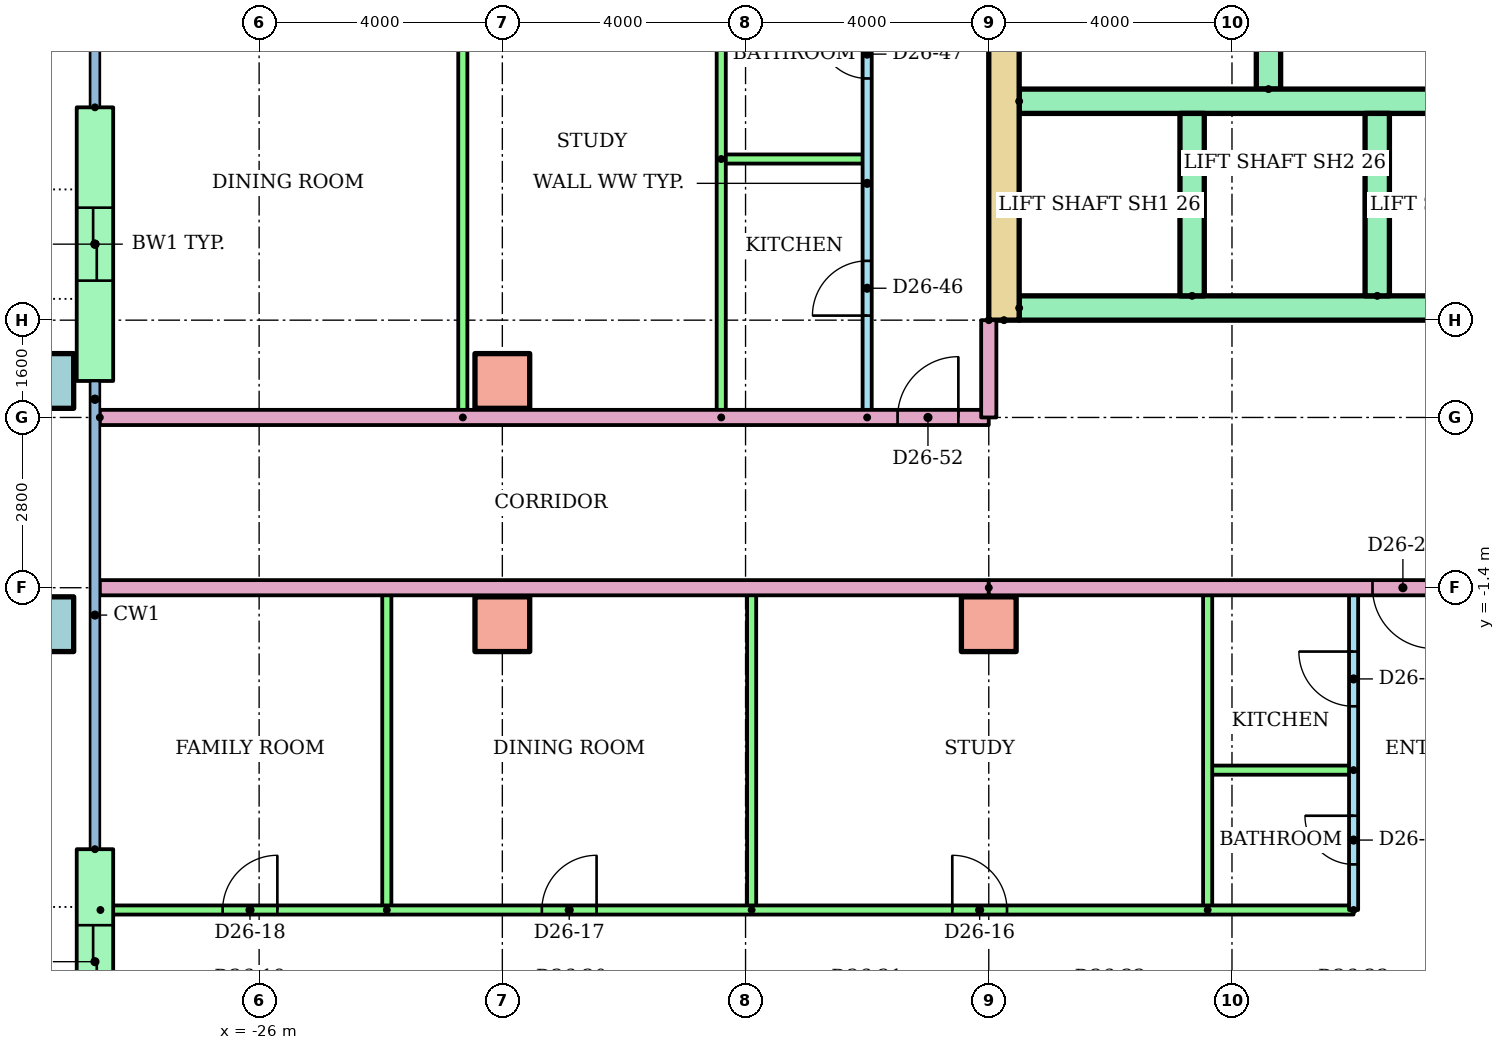
"""IFC4 building model, lengths in metres.
Left out: names, types, materials, properties, quantities, classifications, styles, units other than length and angle.
Written with IfcOpenShell. Run it as: python <this file> out.ifc"""

import sys

from ifc_helpers import new_model, si_unit, direction, frame, frame_2d, origin, origin_2d, place, context, subcontext, project, spatial, rectangle, hollow_rectangle, extrude, element, fill, save


model = new_model("IFC4")
c1 = context("Model", 3, precision=1e-05, world=origin(), true_north=direction((0.0, 1.0)))
c2 = subcontext(c1, "Body", "Model", "MODEL_VIEW")
j1 = project(units=[si_unit("LENGTHUNIT", "METRE"), si_unit("PLANEANGLEUNIT", "RADIAN")], contexts=[c1])
p1 = place(None, origin())
s1 = spatial("IfcSite", under=j1, at=p1, CompositionType="ELEMENT")
p2 = place(p1, origin())
s2 = spatial("IfcBuilding", under=s1, at=p2, CompositionType="ELEMENT")
p3 = place(p2, frame((0.0, 0.0, 99.9)))
s3 = spatial("IfcBuildingStorey", under=s2, at=p3, CompositionType="ELEMENT", Elevation=99.9)
p4 = place(p3, frame((-29.5, -2.0, 0.0)))
e1 = element("IfcColumn", 1, at=p4, inside=s3, PredefinedType="COLUMN", context=c2, shape_type="SweptSolid", body=[
    extrude(hollow_rectangle(XDim=0.9, YDim=0.9, WallThickness=0.045, at=origin_2d()), origin(), (0.0, 0.0, 1.0), 3.2),
])
for number, where in (
    (2, (-22.0, -2.0, 0.0)),
    (3, (-14.0, -2.0, 0.0)),
):
    element("IfcColumn", number, at=place(p3, frame(where)), inside=s3, PredefinedType="COLUMN", context=c2, shape_type="SweptSolid", body=[
        extrude(rectangle(XDim=0.9, YDim=0.9, at=origin_2d()), origin(), (0.0, 0.0, 1.0), 3.2),
    ])
p5 = place(p3, frame((-29.5, 2.0, 0.0)))
e4 = element("IfcColumn", 4, at=p5, inside=s3, PredefinedType="COLUMN", context=c2, shape_type="SweptSolid", body=[
    extrude(hollow_rectangle(XDim=0.9, YDim=0.9, WallThickness=0.045, at=origin_2d()), origin(), (0.0, 0.0, 1.0), 3.2),
])
p6 = place(p3, frame((-22.0, 2.0, 0.0)))
e5 = element("IfcColumn", 5, at=p6, inside=s3, PredefinedType="COLUMN", context=c2, shape_type="SweptSolid", body=[
    extrude(rectangle(XDim=0.9, YDim=0.9, at=origin_2d()), origin(), (0.0, 0.0, 1.0), 3.2),
])
p7 = place(p3, frame((-28.7, 6.5, 0.0), z_axis=(0.0, 0.0, 1.0), x_axis=(0.0, -1.0, 0.0)))
e6 = element("IfcWall", 6, at=p7, inside=s3, PredefinedType="STANDARD", context=c2, shape_type="SweptSolid", body=[
    extrude(rectangle(XDim=4.5, YDim=0.6, at=frame_2d((2.25, 0.0))), origin(), (0.0, 0.0, 1.0), 2.92),
])
p8 = place(p7, frame((1.65, 0.0, 0.0)))
e7 = element("IfcOpeningElement", 7, at=p8, cuts=e6, PredefinedType="OPENING", context=c2, shape_type="SweptSolid", body=[
    extrude(rectangle(XDim=1.2, YDim=2.1, at=frame_2d((0.6, 1.05))), frame((0.0, 0.31, 0.0), z_axis=(0.0, -1.0, 0.0), x_axis=(1.0, 0.0, 0.0)), (0.0, 0.0, 1.0), 0.62),
])
p9 = place(p3, frame((-28.7, -5.7, 0.0), z_axis=(0.0, 0.0, 1.0), x_axis=(0.0, -1.0, 0.0)))
e8 = element("IfcWall", 8, at=p9, inside=s3, PredefinedType="STANDARD", context=c2, shape_type="SweptSolid", body=[
    extrude(rectangle(XDim=3.7, YDim=0.6, at=frame_2d((1.85, 0.0))), origin(), (0.0, 0.0, 1.0), 2.92),
])
p10 = place(p9, frame((1.25, 0.0, 0.0)))
e9 = element("IfcOpeningElement", 9, at=p10, cuts=e8, PredefinedType="OPENING", context=c2, shape_type="SweptSolid", body=[
    extrude(rectangle(XDim=1.2, YDim=2.1, at=frame_2d((0.6, 1.05))), frame((0.0, 0.31, 0.0), z_axis=(0.0, -1.0, 0.0), x_axis=(1.0, 0.0, 0.0)), (0.0, 0.0, 1.0), 0.62),
])
p11 = place(p3, frame((-13.75, 3.0, 0.0), z_axis=(0.0, 0.0, 1.0), x_axis=(0.0, 1.0, 0.0)))
e10 = element("IfcWall", 10, at=p11, inside=s3, PredefinedType="SHEAR", context=c2, shape_type="SweptSolid", body=[
    extrude(rectangle(XDim=17.0, YDim=0.5, at=frame_2d((8.5, 0.0))), origin(), (0.0, 0.0, 1.0), 2.92),
])
p12 = place(p3, frame((-9.4, 6.8, 0.0), z_axis=(0.0, 0.0, 1.0), x_axis=(0.0, 1.0, 0.0)))
e11 = element("IfcWall", 11, at=p12, inside=s3, PredefinedType="SHEAR", context=c2, shape_type="SweptSolid", body=[
    extrude(rectangle(XDim=12.7, YDim=0.4, at=frame_2d((6.35, 0.0))), origin(), (0.0, 0.0, 1.0), 2.92),
])
p13 = place(p12, frame((1.15, 0.0, 0.0)))
e12 = element("IfcOpeningElement", 12, at=p13, cuts=e11, PredefinedType="OPENING", context=c2, shape_type="SweptSolid", body=[
    extrude(rectangle(XDim=1.0, YDim=2.1, at=frame_2d((0.5, 1.05))), frame((0.0, 0.21, 0.0), z_axis=(0.0, -1.0, 0.0), x_axis=(1.0, 0.0, 0.0)), (0.0, 0.0, 1.0), 0.42),
])
p14 = place(p12, frame((7.925, 0.0, 0.0)))
e13 = element("IfcOpeningElement", 13, at=p14, cuts=e11, PredefinedType="OPENING", context=c2, shape_type="SweptSolid", body=[
    extrude(rectangle(XDim=1.0, YDim=2.1, at=frame_2d((0.5, 1.05))), frame((0.0, 0.21, 0.0), z_axis=(0.0, -1.0, 0.0), x_axis=(1.0, 0.0, 0.0)), (0.0, 0.0, 1.0), 0.42),
])
p15 = place(p3, frame((-13.5, 3.2, 0.0)))
e14 = element("IfcWall", 14, at=p15, inside=s3, PredefinedType="SHEAR", context=c2, shape_type="SweptSolid", body=[
    extrude(rectangle(XDim=27.0, YDim=0.4, at=frame_2d((13.5, 0.0))), origin(), (0.0, 0.0, 1.0), 2.92),
])
p16 = place(p15, frame((6.861, 0.0, 0.0)))
e15 = element("IfcOpeningElement", 15, at=p16, cuts=e14, PredefinedType="OPENING", context=c2, shape_type="SweptSolid", body=[
    extrude(rectangle(XDim=1.1, YDim=2.1, at=frame_2d((0.55, 1.05))), frame((0.0, 0.21, 0.0), z_axis=(0.0, -1.0, 0.0), x_axis=(1.0, 0.0, 0.0)), (0.0, 0.0, 1.0), 0.42),
])
p17 = place(p15, frame((9.906, 0.0, 0.0)))
e16 = element("IfcOpeningElement", 16, at=p17, cuts=e14, PredefinedType="OPENING", context=c2, shape_type="SweptSolid", body=[
    extrude(rectangle(XDim=1.1, YDim=2.1, at=frame_2d((0.55, 1.05))), frame((0.0, 0.21, 0.0), z_axis=(0.0, -1.0, 0.0), x_axis=(1.0, 0.0, 0.0)), (0.0, 0.0, 1.0), 0.42),
])
p18 = place(p15, frame((15.994, 0.0, 0.0)))
e17 = element("IfcOpeningElement", 17, at=p18, cuts=e14, PredefinedType="OPENING", context=c2, shape_type="SweptSolid", body=[
    extrude(rectangle(XDim=1.1, YDim=2.1, at=frame_2d((0.55, 1.05))), frame((0.0, 0.21, 0.0), z_axis=(0.0, -1.0, 0.0), x_axis=(1.0, 0.0, 0.0)), (0.0, 0.0, 1.0), 0.42),
])
p19 = place(p15, frame((19.039, 0.0, 0.0)))
e18 = element("IfcOpeningElement", 18, at=p19, cuts=e14, PredefinedType="OPENING", context=c2, shape_type="SweptSolid", body=[
    extrude(rectangle(XDim=1.1, YDim=2.1, at=frame_2d((0.55, 1.05))), frame((0.0, 0.21, 0.0), z_axis=(0.0, -1.0, 0.0), x_axis=(1.0, 0.0, 0.0)), (0.0, 0.0, 1.0), 0.42),
])
p20 = place(p15, frame((12.6, 0.0, 0.0)))
e19 = element("IfcOpeningElement", 19, at=p20, cuts=e14, PredefinedType="OPENING", context=c2, shape_type="SweptSolid", body=[
    extrude(rectangle(XDim=1.8, YDim=2.1, at=frame_2d((0.9, 1.05))), frame((0.0, 0.21, 0.0), z_axis=(0.0, -1.0, 0.0), x_axis=(1.0, 0.0, 0.0)), (0.0, 0.0, 1.0), 0.42),
])
p21 = place(p3, frame((-13.5, 6.6, 0.0)))
e20 = element("IfcWall", 20, at=p21, inside=s3, PredefinedType="SHEAR", context=c2, shape_type="SweptSolid", body=[
    extrude(rectangle(XDim=11.978, YDim=0.4, at=frame_2d((5.989, 0.0))), origin(), (0.0, 0.0, 1.0), 2.92),
])
for number, where, z_axis, x_axis in (
    (21, (-10.656, 3.4, 0.0), (0.0, 0.0, 1.0), (0.0, 1.0, 0.0)),
    (22, (-7.611, 3.4, 0.0), (0.0, 0.0, 1.0), (0.0, 1.0, 0.0)),
):
    element("IfcWall", number, at=place(p3, frame(where, z_axis=z_axis, x_axis=x_axis)), inside=s3, PredefinedType="SHEAR", context=c2, shape_type="SweptSolid", body=[
        extrude(rectangle(XDim=3.0, YDim=0.4, at=frame_2d((1.5, 0.0))), origin(), (0.0, 0.0, 1.0), 2.92),
    ])
p22 = place(p3, frame((-8.0, -6.7, 0.0), z_axis=(0.0, 0.0, 1.0), x_axis=(0.0, 1.0, 0.0)))
e23 = element("IfcWall", 23, at=p22, inside=s3, PredefinedType="PARTITIONING", context=c2, shape_type="SweptSolid", body=[
    extrude(rectangle(XDim=5.3, YDim=0.15, at=frame_2d((2.65, 0.0))), origin(), (0.0, 0.0, 1.0), 2.4),
])
p23 = place(p22, frame((3.35, 0.0, 0.0)))
e24 = element("IfcOpeningElement", 24, at=p23, cuts=e23, PredefinedType="OPENING", context=c2, shape_type="SweptSolid", body=[
    extrude(rectangle(XDim=0.9, YDim=2.1, at=frame_2d((0.45, 1.05))), frame((0.0, 0.085, 0.0), z_axis=(0.0, -1.0, 0.0), x_axis=(1.0, 0.0, 0.0)), (0.0, 0.0, 1.0), 0.17),
])
p24 = place(p22, frame((0.75, 0.0, 0.0)))
e25 = element("IfcOpeningElement", 25, at=p24, cuts=e23, PredefinedType="OPENING", context=c2, shape_type="SweptSolid", body=[
    extrude(rectangle(XDim=0.8, YDim=2.1, at=frame_2d((0.4, 1.05))), frame((0.0, 0.085, 0.0), z_axis=(0.0, -1.0, 0.0), x_axis=(1.0, 0.0, 0.0)), (0.0, 0.0, 1.0), 0.17),
])
p25 = place(p3, frame((-8.0, -4.4, 0.0), z_axis=(0.0, 0.0, 1.0), x_axis=(-1.0, 0.0, 0.0)))
e26 = element("IfcWall", 26, at=p25, inside=s3, PredefinedType="PARTITIONING", context=c2, shape_type="SweptSolid", body=[
    extrude(rectangle(XDim=2.4, YDim=0.15, at=frame_2d((1.2, 0.0))), origin(), (0.0, 0.0, 1.0), 2.4),
])
for number, where, z_axis, x_axis in (
    (27, (-10.4, -6.7, 0.0), (0.0, 0.0, 1.0), (0.0, 1.0, 0.0)),
    (28, (-17.9, -6.7, 0.0), (0.0, 0.0, 1.0), (0.0, 1.0, 0.0)),
    (29, (-23.9, -6.7, 0.0), (0.0, 0.0, 1.0), (0.0, 1.0, 0.0)),
):
    element("IfcWall", number, at=place(p3, frame(where, z_axis=z_axis, x_axis=x_axis)), inside=s3, PredefinedType="PARTITIONING", context=c2, shape_type="SweptSolid", body=[
        extrude(rectangle(XDim=5.3, YDim=0.15, at=frame_2d((2.65, 0.0))), origin(), (0.0, 0.0, 1.0), 2.4),
    ])
p26 = place(p3, frame((-28.61, -6.7, 0.0)))
e30 = element("IfcWall", 30, at=p26, inside=s3, PredefinedType="PARTITIONING", context=c2, shape_type="SweptSolid", body=[
    extrude(rectangle(XDim=20.61, YDim=0.15, at=frame_2d((10.305, 0.0))), origin(), (0.0, 0.0, 1.0), 2.4),
])
p27 = place(p26, frame((14.01, 0.0, 0.0)))
e31 = element("IfcOpeningElement", 31, at=p27, cuts=e30, PredefinedType="OPENING", context=c2, shape_type="SweptSolid", body=[
    extrude(rectangle(XDim=0.9, YDim=2.1, at=frame_2d((0.45, 1.05))), frame((0.0, 0.085, 0.0), z_axis=(0.0, -1.0, 0.0), x_axis=(1.0, 0.0, 0.0)), (0.0, 0.0, 1.0), 0.17),
])
p28 = place(p26, frame((7.26, 0.0, 0.0)))
e32 = element("IfcOpeningElement", 32, at=p28, cuts=e30, PredefinedType="OPENING", context=c2, shape_type="SweptSolid", body=[
    extrude(rectangle(XDim=0.9, YDim=2.1, at=frame_2d((0.45, 1.05))), frame((0.0, 0.085, 0.0), z_axis=(0.0, -1.0, 0.0), x_axis=(1.0, 0.0, 0.0)), (0.0, 0.0, 1.0), 0.17),
])
p29 = place(p26, frame((2.01, 0.0, 0.0)))
e33 = element("IfcOpeningElement", 33, at=p29, cuts=e30, PredefinedType="OPENING", context=c2, shape_type="SweptSolid", body=[
    extrude(rectangle(XDim=0.9, YDim=2.1, at=frame_2d((0.45, 1.05))), frame((0.0, 0.085, 0.0), z_axis=(0.0, -1.0, 0.0), x_axis=(1.0, 0.0, 0.0)), (0.0, 0.0, 1.0), 0.17),
])
p30 = place(p3, frame((-14.0, -1.4, 0.0), z_axis=(0.0, 0.0, 1.0), x_axis=(-1.0, 0.0, 0.0)))
e34 = element("IfcWall", 34, at=p30, inside=s3, PredefinedType="PARTITIONING", context=c2, shape_type="SweptSolid", body=[
    extrude(rectangle(XDim=14.62, YDim=0.25, at=frame_2d((7.31, 0.0))), origin(), (0.0, 0.0, 1.0), 2.4),
])
p31 = place(p3, frame((-16.0, 1.4, 0.0), z_axis=(0.0, 0.0, 1.0), x_axis=(0.0, 1.0, 0.0)))
e35 = element("IfcWall", 35, at=p31, inside=s3, PredefinedType="PARTITIONING", context=c2, shape_type="SweptSolid", body=[
    extrude(rectangle(XDim=7.7, YDim=0.15, at=frame_2d((3.85, 0.0))), origin(), (0.0, 0.0, 1.0), 2.4),
])
p32 = place(p31, frame((1.675, 0.0, 0.0)))
e36 = element("IfcOpeningElement", 36, at=p32, cuts=e35, PredefinedType="OPENING", context=c2, shape_type="SweptSolid", body=[
    extrude(rectangle(XDim=0.9, YDim=2.1, at=frame_2d((0.45, 1.05))), frame((0.0, 0.085, 0.0), z_axis=(0.0, -1.0, 0.0), x_axis=(1.0, 0.0, 0.0)), (0.0, 0.0, 1.0), 0.17),
])
p33 = place(p31, frame((5.575, 0.0, 0.0)))
e37 = element("IfcOpeningElement", 37, at=p33, cuts=e35, PredefinedType="OPENING", context=c2, shape_type="SweptSolid", body=[
    extrude(rectangle(XDim=0.8, YDim=2.1, at=frame_2d((0.4, 1.05))), frame((0.0, 0.085, 0.0), z_axis=(0.0, -1.0, 0.0), x_axis=(1.0, 0.0, 0.0)), (0.0, 0.0, 1.0), 0.17),
])
p34 = place(p3, frame((-18.4, 5.65, 0.0)))
e38 = element("IfcWall", 38, at=p34, inside=s3, PredefinedType="PARTITIONING", context=c2, shape_type="SweptSolid", body=[
    extrude(rectangle(XDim=2.4, YDim=0.15, at=frame_2d((1.2, 0.0))), origin(), (0.0, 0.0, 1.0), 2.4),
])
for number, where, z_axis, x_axis in (
    (39, (-18.4, 1.4, 0.0), (0.0, 0.0, 1.0), (0.0, 1.0, 0.0)),
    (40, (-22.65, 1.4, 0.0), (0.0, 0.0, 1.0), (0.0, 1.0, 0.0)),
):
    element("IfcWall", number, at=place(p3, frame(where, z_axis=z_axis, x_axis=x_axis)), inside=s3, PredefinedType="PARTITIONING", context=c2, shape_type="SweptSolid", body=[
        extrude(rectangle(XDim=7.7, YDim=0.15, at=frame_2d((3.85, 0.0))), origin(), (0.0, 0.0, 1.0), 2.4),
    ])
p35 = place(p3, frame((-28.62, 1.4, 0.0)))
e41 = element("IfcWall", 41, at=p35, inside=s3, PredefinedType="PARTITIONING", context=c2, shape_type="SweptSolid", body=[
    extrude(rectangle(XDim=14.62, YDim=0.25, at=frame_2d((7.31, 0.0))), origin(), (0.0, 0.0, 1.0), 2.4),
])
p36 = place(p35, frame((13.12, 0.0, 0.0)))
e42 = element("IfcOpeningElement", 42, at=p36, cuts=e41, PredefinedType="OPENING", context=c2, shape_type="SweptSolid", body=[
    extrude(rectangle(XDim=1.0, YDim=2.1, at=frame_2d((0.5, 1.05))), frame((0.0, 0.135, 0.0), z_axis=(0.0, -1.0, 0.0), x_axis=(1.0, 0.0, 0.0)), (0.0, 0.0, 1.0), 0.27),
])
p37 = place(p3, frame((14.0, -1.4, 0.0), z_axis=(0.0, 0.0, 1.0), x_axis=(-1.0, 0.0, 0.0)))
e43 = element("IfcWall", 43, at=p37, inside=s3, PredefinedType="PARTITIONING", context=c2, shape_type="SweptSolid", body=[
    extrude(rectangle(XDim=28.0, YDim=0.25, at=frame_2d((14.0, 0.0))), origin(), (0.0, 0.0, 1.0), 2.4),
])
p38 = place(p37, frame((20.689, 0.0, 0.0)))
e44 = element("IfcOpeningElement", 44, at=p38, cuts=e43, PredefinedType="OPENING", context=c2, shape_type="SweptSolid", body=[
    extrude(rectangle(XDim=1.0, YDim=2.1, at=frame_2d((0.5, 1.05))), frame((0.0, 0.135, 0.0), z_axis=(0.0, -1.0, 0.0), x_axis=(1.0, 0.0, 0.0)), (0.0, 0.0, 1.0), 0.27),
])
p39 = place(p37, frame((18.311, 0.0, 0.0)))
e45 = element("IfcOpeningElement", 45, at=p39, cuts=e43, PredefinedType="OPENING", context=c2, shape_type="SweptSolid", body=[
    extrude(rectangle(XDim=1.0, YDim=2.1, at=frame_2d((0.5, 1.05))), frame((0.0, 0.135, 0.0), z_axis=(0.0, -1.0, 0.0), x_axis=(1.0, 0.0, 0.0)), (0.0, 0.0, 1.0), 0.27),
])
p40 = place(p3, frame((-14.0, 3.0, 0.0), z_axis=(0.0, 0.0, 1.0), x_axis=(0.0, -1.0, 0.0)))
e46 = element("IfcWall", 46, at=p40, inside=s3, PredefinedType="PARTITIONING", context=c2, shape_type="SweptSolid", body=[
    extrude(rectangle(XDim=1.6, YDim=0.25, at=frame_2d((0.8, 0.0))), origin(), (0.0, 0.0, 1.0), 2.4),
])
p41 = place(p23, origin())
e47 = element("IfcDoor", 47, at=p41, inside=s3, OperationType="SINGLE_SWING_RIGHT", PredefinedType="DOOR", context=c2, shape_type="SweptSolid", body=[
    extrude(rectangle(XDim=0.9, YDim=2.1, at=frame_2d((0.45, 1.05))), frame((0.0, 0.025, 0.0), z_axis=(0.0, -1.0, 0.0), x_axis=(1.0, 0.0, 0.0)), (0.0, 0.0, 1.0), 0.05),
])
fill(e24, e47)
p42 = place(p24, origin())
e48 = element("IfcDoor", 48, at=p42, inside=s3, OperationType="SINGLE_SWING_RIGHT", PredefinedType="DOOR", context=c2, shape_type="SweptSolid", body=[
    extrude(rectangle(XDim=0.8, YDim=2.1, at=frame_2d((0.4, 1.05))), frame((0.0, 0.025, 0.0), z_axis=(0.0, -1.0, 0.0), x_axis=(1.0, 0.0, 0.0)), (0.0, 0.0, 1.0), 0.05),
])
fill(e25, e48)
p43 = place(p27, origin())
e49 = element("IfcDoor", 49, at=p43, inside=s3, OperationType="SINGLE_SWING_LEFT", PredefinedType="DOOR", context=c2, shape_type="SweptSolid", body=[
    extrude(rectangle(XDim=0.9, YDim=2.1, at=frame_2d((0.45, 1.05))), frame((0.0, 0.025, 0.0), z_axis=(0.0, -1.0, 0.0), x_axis=(1.0, 0.0, 0.0)), (0.0, 0.0, 1.0), 0.05),
])
fill(e31, e49)
p44 = place(p28, origin())
e50 = element("IfcDoor", 50, at=p44, inside=s3, OperationType="SINGLE_SWING_RIGHT", PredefinedType="DOOR", context=c2, shape_type="SweptSolid", body=[
    extrude(rectangle(XDim=0.9, YDim=2.1, at=frame_2d((0.45, 1.05))), frame((0.0, 0.025, 0.0), z_axis=(0.0, -1.0, 0.0), x_axis=(1.0, 0.0, 0.0)), (0.0, 0.0, 1.0), 0.05),
])
fill(e32, e50)
p45 = place(p29, origin())
e51 = element("IfcDoor", 51, at=p45, inside=s3, OperationType="SINGLE_SWING_RIGHT", PredefinedType="DOOR", context=c2, shape_type="SweptSolid", body=[
    extrude(rectangle(XDim=0.9, YDim=2.1, at=frame_2d((0.45, 1.05))), frame((0.0, 0.025, 0.0), z_axis=(0.0, -1.0, 0.0), x_axis=(1.0, 0.0, 0.0)), (0.0, 0.0, 1.0), 0.05),
])
fill(e33, e51)
p46 = place(p38, origin())
e52 = element("IfcDoor", 52, at=p46, inside=s3, OperationType="SINGLE_SWING_LEFT", PredefinedType="DOOR", context=c2, shape_type="SweptSolid", body=[
    extrude(rectangle(XDim=1.0, YDim=2.1, at=frame_2d((0.5, 1.05))), frame((0.0, 0.025, 0.0), z_axis=(0.0, -1.0, 0.0), x_axis=(1.0, 0.0, 0.0)), (0.0, 0.0, 1.0), 0.05),
])
fill(e44, e52)
p47 = place(p32, origin())
e53 = element("IfcDoor", 53, at=p47, inside=s3, OperationType="SINGLE_SWING_LEFT", PredefinedType="DOOR", context=c2, shape_type="SweptSolid", body=[
    extrude(rectangle(XDim=0.9, YDim=2.1, at=frame_2d((0.45, 1.05))), frame((0.0, 0.025, 0.0), z_axis=(0.0, -1.0, 0.0), x_axis=(1.0, 0.0, 0.0)), (0.0, 0.0, 1.0), 0.05),
])
fill(e36, e53)
p48 = place(p33, origin())
e54 = element("IfcDoor", 54, at=p48, inside=s3, OperationType="SINGLE_SWING_RIGHT", PredefinedType="DOOR", context=c2, shape_type="SweptSolid", body=[
    extrude(rectangle(XDim=0.8, YDim=2.1, at=frame_2d((0.4, 1.05))), frame((0.0, 0.025, 0.0), z_axis=(0.0, -1.0, 0.0), x_axis=(1.0, 0.0, 0.0)), (0.0, 0.0, 1.0), 0.05),
])
fill(e37, e54)
p49 = place(p36, origin())
e55 = element("IfcDoor", 55, at=p49, inside=s3, OperationType="SINGLE_SWING_RIGHT", PredefinedType="DOOR", context=c2, shape_type="SweptSolid", body=[
    extrude(rectangle(XDim=1.0, YDim=2.1, at=frame_2d((0.5, 1.05))), frame((0.0, 0.025, 0.0), z_axis=(0.0, -1.0, 0.0), x_axis=(1.0, 0.0, 0.0)), (0.0, 0.0, 1.0), 0.05),
])
fill(e42, e55)
p50 = place(p8, origin())
e56 = element("IfcDoor", 56, at=p50, inside=s3, OperationType="SLIDING_TO_LEFT", PredefinedType="DOOR", context=c2, shape_type="SweptSolid", body=[
    extrude(rectangle(XDim=1.2, YDim=2.1, at=frame_2d((0.6, 1.05))), frame((0.0, 0.025, 0.0), z_axis=(0.0, -1.0, 0.0), x_axis=(1.0, 0.0, 0.0)), (0.0, 0.0, 1.0), 0.05),
])
fill(e7, e56)
p51 = place(p10, origin())
e57 = element("IfcDoor", 57, at=p51, inside=s3, OperationType="SLIDING_TO_LEFT", PredefinedType="DOOR", context=c2, shape_type="SweptSolid", body=[
    extrude(rectangle(XDim=1.2, YDim=2.1, at=frame_2d((0.6, 1.05))), frame((0.0, 0.025, 0.0), z_axis=(0.0, -1.0, 0.0), x_axis=(1.0, 0.0, 0.0)), (0.0, 0.0, 1.0), 0.05),
])
fill(e9, e57)
save(model, sys.argv[1])
